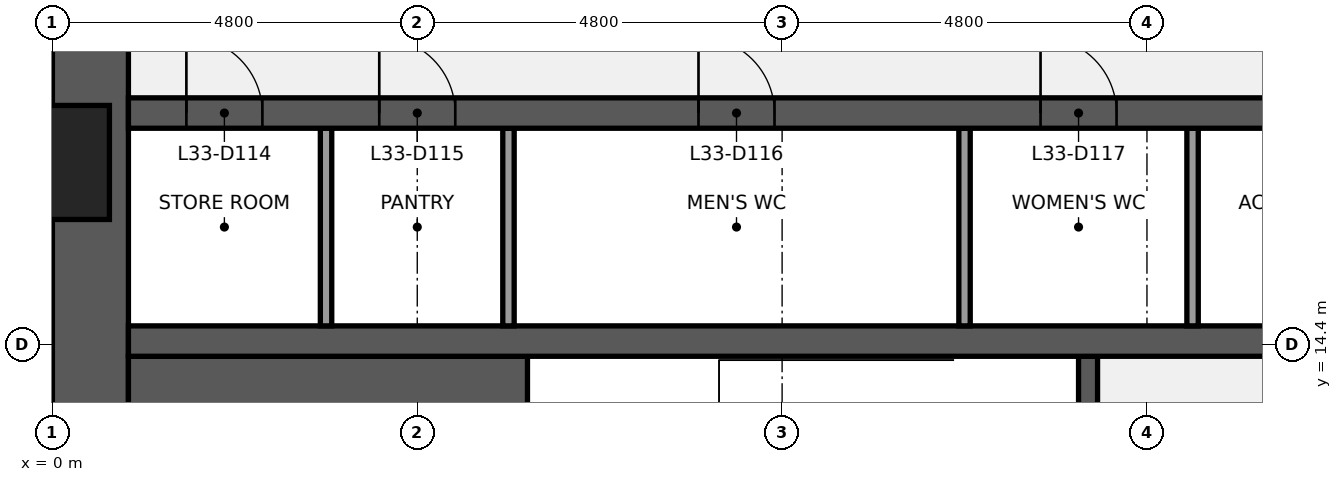
"""IFC4 building model, lengths in metres.
Left out: names, types, materials, properties, quantities, classifications, styles, units other than length and angle.
Written with IfcOpenShell. Run it as: python <this file> out.ifc"""

import sys

from ifc_helpers import new_model, si_unit, direction, frame, frame_2d, origin, place, context, subcontext, project, spatial, rectangle, extrude, element, fill, save


model = new_model("IFC4")
c1 = context("Model", 3, precision=1e-05, world=origin(), true_north=direction((0.0, 1.0)))
c2 = subcontext(c1, "Body", "Model", "MODEL_VIEW")
j1 = project(units=[si_unit("LENGTHUNIT", "METRE"), si_unit("PLANEANGLEUNIT", "RADIAN")], contexts=[c1])
p1 = place(None, origin())
s1 = spatial("IfcSite", under=j1, at=p1, CompositionType="ELEMENT")
p2 = place(p1, origin())
s2 = spatial("IfcBuilding", under=s1, at=p2, CompositionType="ELEMENT")
p3 = place(p2, frame((0.0, 0.0, 152.1)))
s3 = spatial("IfcBuildingStorey", under=s2, at=p3, CompositionType="ELEMENT", Elevation=152.1)
p4 = place(p3, frame((0.5, 9.6, 0.0), z_axis=(0.0, 0.0, 1.0), x_axis=(0.0, 1.0, 0.0)))
e1 = element("IfcWall", 1, at=p4, inside=s3, PredefinedType="SHEAR", context=c2, shape_type="SweptSolid", body=[
    extrude(rectangle(XDim=28.8, YDim=1.0, at=frame_2d((14.4, 0.0))), origin(), (0.0, 0.0, 1.0), 3.84),
])
p5 = place(p4, frame((8.85, 0.0, 0.9)))
e2 = element("IfcOpeningElement", 2, at=p5, cuts=e1, PredefinedType="OPENING", context=c2, shape_type="SweptSolid", body=[
    extrude(rectangle(XDim=1.5, YDim=1.5, at=frame_2d((0.75, 0.75))), frame((0.0, 0.51, 0.0), z_axis=(0.0, -1.0, 0.0), x_axis=(1.0, 0.0, 0.0)), (0.0, 0.0, 1.0), 1.02),
])
p6 = place(p4, frame((18.45, 0.0, 0.9)))
e3 = element("IfcOpeningElement", 3, at=p6, cuts=e1, PredefinedType="OPENING", context=c2, shape_type="SweptSolid", body=[
    extrude(rectangle(XDim=1.5, YDim=1.5, at=frame_2d((0.75, 0.75))), frame((0.0, 0.51, 0.0), z_axis=(0.0, -1.0, 0.0), x_axis=(1.0, 0.0, 0.0)), (0.0, 0.0, 1.0), 1.02),
])
p7 = place(p3, frame((1.0, 12.425, 0.0), z_axis=(0.0, 0.0, 1.0), x_axis=(1.0, 0.0, 0.0)))
e4 = element("IfcWall", 4, at=p7, inside=s3, PredefinedType="SHEAR", context=c2, shape_type="SweptSolid", body=[
    extrude(rectangle(XDim=5.25, YDim=3.65, at=frame_2d((2.625, 0.0))), origin(), (0.0, 0.0, 1.0), 3.84),
])
p8 = place(p3, frame((13.625, 10.8, 0.0), z_axis=(0.0, 0.0, 1.0), x_axis=(0.0, 1.0, 0.0)))
e5 = element("IfcWall", 5, at=p8, inside=s3, PredefinedType="SHEAR", context=c2, shape_type="SweptSolid", body=[
    extrude(rectangle(XDim=3.45, YDim=0.25, at=frame_2d((1.725, 0.0))), origin(), (0.0, 0.0, 1.0), 3.84),
])
p9 = place(p8, frame((1.175, 0.0, 0.0)))
e6 = element("IfcOpeningElement", 6, at=p9, cuts=e5, PredefinedType="OPENING", context=c2, shape_type="SweptSolid", body=[
    extrude(rectangle(XDim=1.1, YDim=2.1, at=frame_2d((0.55, 1.05))), frame((0.0, 0.135, 0.0), z_axis=(0.0, -1.0, 0.0), x_axis=(1.0, 0.0, 0.0)), (0.0, 0.0, 1.0), 0.27),
])
p10 = place(p3, frame((1.0, 14.45, 0.0), z_axis=(0.0, 0.0, 1.0), x_axis=(1.0, 0.0, 0.0)))
e7 = element("IfcWall", 7, at=p10, inside=s3, PredefinedType="SHEAR", context=c2, shape_type="SweptSolid", body=[
    extrude(rectangle(XDim=17.2, YDim=0.4, at=frame_2d((8.6, 0.0))), origin(), (0.0, 0.0, 1.0), 3.84),
])
for number, where, z_axis, x_axis in (
    (8, (3.6, 14.65, 0.0), (0.0, 0.0, 1.0), (0.0, 1.0, 0.0)),
    (9, (6.0, 14.65, 0.0), (0.0, 0.0, 1.0), (0.0, 1.0, 0.0)),
    (10, (12.0, 14.65, 0.0), (0.0, 0.0, 1.0), (0.0, 1.0, 0.0)),
    (11, (15.0, 14.65, 0.0), (0.0, 0.0, 1.0), (0.0, 1.0, 0.0)),
):
    element("IfcWall", number, at=place(p3, frame(where, z_axis=z_axis, x_axis=x_axis)), inside=s3, PredefinedType="PARTITIONING", context=c2, shape_type="SweptSolid", body=[
        extrude(rectangle(XDim=2.6, YDim=0.15, at=frame_2d((1.3, 0.0))), origin(), (0.0, 0.0, 1.0), 3.84),
    ])
p11 = place(p3, frame((1.0, 17.45, 0.0), z_axis=(0.0, 0.0, 1.0), x_axis=(1.0, 0.0, 0.0)))
e12 = element("IfcWall", 12, at=p11, inside=s3, PredefinedType="SHEAR", context=c2, shape_type="SweptSolid", body=[
    extrude(rectangle(XDim=17.2, YDim=0.4, at=frame_2d((8.6, 0.0))), origin(), (0.0, 0.0, 1.0), 3.84),
])
p12 = place(p11, frame((0.762, 0.0, 0.0)))
e13 = element("IfcOpeningElement", 13, at=p12, cuts=e12, PredefinedType="OPENING", context=c2, shape_type="SweptSolid", body=[
    extrude(rectangle(XDim=1.0, YDim=2.1, at=frame_2d((0.5, 1.05))), frame((0.0, 0.21, 0.0), z_axis=(0.0, -1.0, 0.0), x_axis=(1.0, 0.0, 0.0)), (0.0, 0.0, 1.0), 0.42),
])
p13 = place(p11, frame((3.3, 0.0, 0.0)))
e14 = element("IfcOpeningElement", 14, at=p13, cuts=e12, PredefinedType="OPENING", context=c2, shape_type="SweptSolid", body=[
    extrude(rectangle(XDim=1.0, YDim=2.1, at=frame_2d((0.5, 1.05))), frame((0.0, 0.21, 0.0), z_axis=(0.0, -1.0, 0.0), x_axis=(1.0, 0.0, 0.0)), (0.0, 0.0, 1.0), 0.42),
])
p14 = place(p11, frame((7.5, 0.0, 0.0)))
e15 = element("IfcOpeningElement", 15, at=p14, cuts=e12, PredefinedType="OPENING", context=c2, shape_type="SweptSolid", body=[
    extrude(rectangle(XDim=1.0, YDim=2.1, at=frame_2d((0.5, 1.05))), frame((0.0, 0.21, 0.0), z_axis=(0.0, -1.0, 0.0), x_axis=(1.0, 0.0, 0.0)), (0.0, 0.0, 1.0), 0.42),
])
p15 = place(p11, frame((12.0, 0.0, 0.0)))
e16 = element("IfcOpeningElement", 16, at=p15, cuts=e12, PredefinedType="OPENING", context=c2, shape_type="SweptSolid", body=[
    extrude(rectangle(XDim=1.0, YDim=2.1, at=frame_2d((0.5, 1.05))), frame((0.0, 0.21, 0.0), z_axis=(0.0, -1.0, 0.0), x_axis=(1.0, 0.0, 0.0)), (0.0, 0.0, 1.0), 0.42),
])
p16 = place(p11, frame((15.137, 0.0, 0.0)))
e17 = element("IfcOpeningElement", 17, at=p16, cuts=e12, PredefinedType="OPENING", context=c2, shape_type="SweptSolid", body=[
    extrude(rectangle(XDim=1.0, YDim=2.1, at=frame_2d((0.5, 1.05))), frame((0.0, 0.21, 0.0), z_axis=(0.0, -1.0, 0.0), x_axis=(1.0, 0.0, 0.0)), (0.0, 0.0, 1.0), 0.42),
])
p17 = place(p12, origin())
e18 = element("IfcDoor", 18, at=p17, inside=s3, OperationType="SINGLE_SWING_LEFT", PredefinedType="DOOR", context=c2, shape_type="SweptSolid", body=[
    extrude(rectangle(XDim=1.0, YDim=2.1, at=frame_2d((0.5, 1.05))), frame((0.0, 0.025, 0.0), z_axis=(0.0, -1.0, 0.0), x_axis=(1.0, 0.0, 0.0)), (0.0, 0.0, 1.0), 0.05),
])
fill(e13, e18)
p18 = place(p13, origin())
e19 = element("IfcDoor", 19, at=p18, inside=s3, OperationType="SINGLE_SWING_LEFT", PredefinedType="DOOR", context=c2, shape_type="SweptSolid", body=[
    extrude(rectangle(XDim=1.0, YDim=2.1, at=frame_2d((0.5, 1.05))), frame((0.0, 0.025, 0.0), z_axis=(0.0, -1.0, 0.0), x_axis=(1.0, 0.0, 0.0)), (0.0, 0.0, 1.0), 0.05),
])
fill(e14, e19)
p19 = place(p14, origin())
e20 = element("IfcDoor", 20, at=p19, inside=s3, OperationType="SINGLE_SWING_LEFT", PredefinedType="DOOR", context=c2, shape_type="SweptSolid", body=[
    extrude(rectangle(XDim=1.0, YDim=2.1, at=frame_2d((0.5, 1.05))), frame((0.0, 0.025, 0.0), z_axis=(0.0, -1.0, 0.0), x_axis=(1.0, 0.0, 0.0)), (0.0, 0.0, 1.0), 0.05),
])
fill(e15, e20)
p20 = place(p15, origin())
e21 = element("IfcDoor", 21, at=p20, inside=s3, OperationType="SINGLE_SWING_LEFT", PredefinedType="DOOR", context=c2, shape_type="SweptSolid", body=[
    extrude(rectangle(XDim=1.0, YDim=2.1, at=frame_2d((0.5, 1.05))), frame((0.0, 0.025, 0.0), z_axis=(0.0, -1.0, 0.0), x_axis=(1.0, 0.0, 0.0)), (0.0, 0.0, 1.0), 0.05),
])
fill(e16, e21)
save(model, sys.argv[1])
